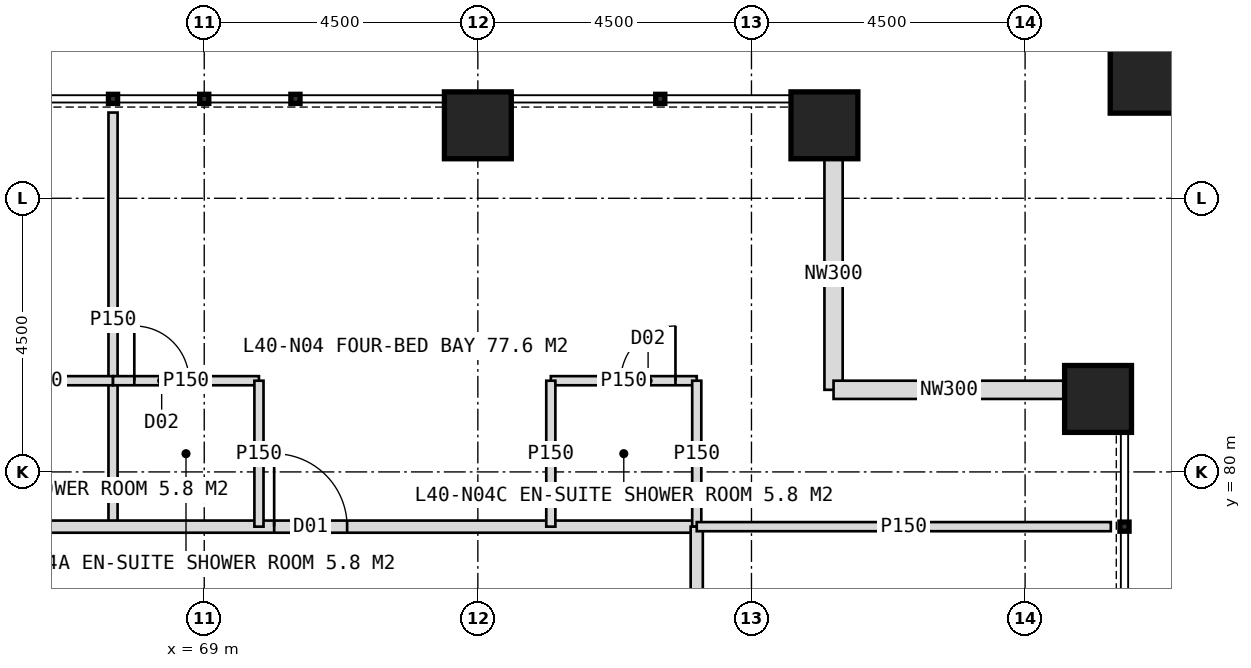
"""IFC4 building model, lengths in metres.
Left out: names, types, materials, properties, quantities, classifications, styles, units other than length and angle.
Written with IfcOpenShell. Run it as: python <this file> out.ifc"""

import sys

from ifc_helpers import new_model, si_unit, direction, frame, frame_2d, origin, origin_2d, place, context, subcontext, project, spatial, rectangle, hollow_rectangle, extrude, element, fill, save


model = new_model("IFC4")
c1 = context("Model", 3, precision=1e-05, world=origin(), true_north=direction((0.0, 1.0)))
c2 = subcontext(c1, "Body", "Model", "MODEL_VIEW")
j1 = project(units=[si_unit("LENGTHUNIT", "METRE"), si_unit("PLANEANGLEUNIT", "RADIAN")], contexts=[c1])
p1 = place(None, origin())
s1 = spatial("IfcSite", under=j1, at=p1, CompositionType="ELEMENT")
p2 = place(p1, origin())
s2 = spatial("IfcBuilding", under=s1, at=p2, CompositionType="ELEMENT")
p3 = place(p2, frame((0.0, 0.0, 168.0)))
s3 = spatial("IfcBuildingStorey", under=s2, at=p3, CompositionType="ELEMENT", Elevation=168.0)
for number, where, z_axis, x_axis in (
    (1, (73.5, 85.7, 0.0), (0.0, 0.0, 1.0), (1.0, 0.0, 0.0)),
    (2, (79.2, 85.7, 0.0), (0.0, 0.0, 1.0), (1.0, 0.0, 0.0)),
    (3, (83.7, 81.2, 0.0), (0.0, 0.0, 1.0), (1.0, 0.0, 0.0)),
):
    element("IfcColumn", number, at=place(p3, frame(where, z_axis=z_axis, x_axis=x_axis)), inside=s3, PredefinedType="COLUMN", context=c2, shape_type="SweptSolid", body=[
        extrude(hollow_rectangle(XDim=1.1, YDim=1.1, WallThickness=0.1, at=origin_2d()), origin(), (0.0, 0.0, 1.0), 4.0),
    ])
p4 = place(p3, frame((84.6, 86.6, 0.0), z_axis=(0.0, 0.0, 1.0), x_axis=(1.0, 0.0, 0.0)))
e4 = element("IfcColumn", 4, at=p4, inside=s3, PredefinedType="COLUMN", context=c2, shape_type="SweptSolid", body=[
    extrude(hollow_rectangle(XDim=1.4, YDim=1.4, WallThickness=0.08, at=origin_2d()), origin(), (0.0, 0.0, 1.0), 2.0),
])
for number, where, z_axis, x_axis in (
    (5, (79.35, 85.15, 0.0), (0.0, 0.0, 1.0), (0.0, -1.0, 0.0)),
    (6, (79.35, 81.35, 0.0), (0.0, 0.0, 1.0), (1.0, 0.0, 0.0)),
):
    element("IfcWall", number, at=place(p3, frame(where, z_axis=z_axis, x_axis=x_axis)), inside=s3, PredefinedType="ELEMENTEDWALL", context=c2, shape_type="SweptSolid", body=[
        extrude(rectangle(XDim=3.8, YDim=0.3, at=frame_2d((1.9, 0.0))), origin(), (0.0, 0.0, 1.0), 4.0),
    ])
p5 = place(p3, frame((67.5, 79.1, 0.0), z_axis=(0.0, 0.0, 1.0), x_axis=(0.0, 1.0, 0.0)))
e7 = element("IfcWall", 7, at=p5, inside=s3, PredefinedType="PARTITIONING", context=c2, shape_type="SweptSolid", body=[
    extrude(rectangle(XDim=6.81, YDim=0.15, at=frame_2d((3.405, 0.0))), origin(), (0.0, 0.0, 1.0), 3.75),
])
p6 = place(p3, frame((42.9, 79.1, 0.0), z_axis=(0.0, 0.0, 1.0), x_axis=(1.0, 0.0, 0.0)))
e8 = element("IfcWall", 8, at=p6, inside=s3, PredefinedType="PARTITIONING", context=c2, shape_type="SweptSolid", body=[
    extrude(rectangle(XDim=34.2, YDim=0.2, at=frame_2d((17.1, 0.0))), origin(), (0.0, 0.0, 1.0), 3.75),
])
p7 = place(p6, frame((3.55, 0.0, 0.0)))
e9 = element("IfcOpeningElement", 9, at=p7, cuts=e8, PredefinedType="OPENING", context=c2, shape_type="SweptSolid", body=[
    extrude(rectangle(XDim=1.0, YDim=2.1, at=frame_2d((0.5, 1.05))), frame((0.0, 0.11, 0.0), z_axis=(0.0, -1.0, 0.0), x_axis=(1.0, 0.0, 0.0)), (0.0, 0.0, 1.0), 0.22),
])
p8 = place(p6, frame((10.75, 0.0, 0.0)))
e10 = element("IfcOpeningElement", 10, at=p8, cuts=e8, PredefinedType="OPENING", context=c2, shape_type="SweptSolid", body=[
    extrude(rectangle(XDim=1.2, YDim=2.2, at=frame_2d((0.6, 1.1))), frame((0.0, 0.11, 0.0), z_axis=(0.0, -1.0, 0.0), x_axis=(1.0, 0.0, 0.0)), (0.0, 0.0, 1.0), 0.22),
])
p9 = place(p6, frame((20.75, 0.0, 0.0)))
e11 = element("IfcOpeningElement", 11, at=p9, cuts=e8, PredefinedType="OPENING", context=c2, shape_type="SweptSolid", body=[
    extrude(rectangle(XDim=1.2, YDim=2.2, at=frame_2d((0.6, 1.1))), frame((0.0, 0.11, 0.0), z_axis=(0.0, -1.0, 0.0), x_axis=(1.0, 0.0, 0.0)), (0.0, 0.0, 1.0), 0.22),
])
p10 = place(p6, frame((27.25, 0.0, 0.0)))
e12 = element("IfcOpeningElement", 12, at=p10, cuts=e8, PredefinedType="OPENING", context=c2, shape_type="SweptSolid", body=[
    extrude(rectangle(XDim=1.2, YDim=2.2, at=frame_2d((0.6, 1.1))), frame((0.0, 0.11, 0.0), z_axis=(0.0, -1.0, 0.0), x_axis=(1.0, 0.0, 0.0)), (0.0, 0.0, 1.0), 0.22),
])
p11 = place(p3, frame((65.1, 81.5, 0.0), z_axis=(0.0, 0.0, 1.0), x_axis=(1.0, 0.0, 0.0)))
e13 = element("IfcWall", 13, at=p11, inside=s3, PredefinedType="PARTITIONING", context=c2, shape_type="SweptSolid", body=[
    extrude(rectangle(XDim=2.4, YDim=0.15, at=frame_2d((1.2, 0.0))), origin(), (0.0, 0.0, 1.0), 3.75),
])
p12 = place(p11, frame((0.35, 0.0, 0.0)))
e14 = element("IfcOpeningElement", 14, at=p12, cuts=e13, PredefinedType="OPENING", context=c2, shape_type="SweptSolid", body=[
    extrude(rectangle(XDim=0.9, YDim=2.1, at=frame_2d((0.45, 1.05))), frame((0.0, 0.085, 0.0), z_axis=(0.0, -1.0, 0.0), x_axis=(1.0, 0.0, 0.0)), (0.0, 0.0, 1.0), 0.17),
])
p13 = place(p3, frame((67.5, 81.5, 0.0), z_axis=(0.0, 0.0, 1.0), x_axis=(1.0, 0.0, 0.0)))
e15 = element("IfcWall", 15, at=p13, inside=s3, PredefinedType="PARTITIONING", context=c2, shape_type="SweptSolid", body=[
    extrude(rectangle(XDim=2.4, YDim=0.15, at=frame_2d((1.2, 0.0))), origin(), (0.0, 0.0, 1.0), 3.75),
])
p14 = place(p13, frame((0.35, 0.0, 0.0)))
e16 = element("IfcOpeningElement", 16, at=p14, cuts=e15, PredefinedType="OPENING", context=c2, shape_type="SweptSolid", body=[
    extrude(rectangle(XDim=0.9, YDim=2.1, at=frame_2d((0.45, 1.05))), frame((0.0, 0.085, 0.0), z_axis=(0.0, -1.0, 0.0), x_axis=(1.0, 0.0, 0.0)), (0.0, 0.0, 1.0), 0.17),
])
p15 = place(p3, frame((69.9, 79.1, 0.0), z_axis=(0.0, 0.0, 1.0), x_axis=(0.0, 1.0, 0.0)))
e17 = element("IfcWall", 17, at=p15, inside=s3, PredefinedType="PARTITIONING", context=c2, shape_type="SweptSolid", body=[
    extrude(rectangle(XDim=2.4, YDim=0.15, at=frame_2d((1.2, 0.0))), origin(), (0.0, 0.0, 1.0), 3.75),
])
p16 = place(p3, frame((74.7, 81.5, 0.0), z_axis=(0.0, 0.0, 1.0), x_axis=(1.0, 0.0, 0.0)))
e18 = element("IfcWall", 18, at=p16, inside=s3, PredefinedType="PARTITIONING", context=c2, shape_type="SweptSolid", body=[
    extrude(rectangle(XDim=2.4, YDim=0.15, at=frame_2d((1.2, 0.0))), origin(), (0.0, 0.0, 1.0), 3.75),
])
p17 = place(p16, frame((1.15, 0.0, 0.0)))
e19 = element("IfcOpeningElement", 19, at=p17, cuts=e18, PredefinedType="OPENING", context=c2, shape_type="SweptSolid", body=[
    extrude(rectangle(XDim=0.9, YDim=2.1, at=frame_2d((0.45, 1.05))), frame((0.0, 0.085, 0.0), z_axis=(0.0, -1.0, 0.0), x_axis=(1.0, 0.0, 0.0)), (0.0, 0.0, 1.0), 0.17),
])
for number, where, z_axis, x_axis in (
    (20, (74.7, 79.1, 0.0), (0.0, 0.0, 1.0), (0.0, 1.0, 0.0)),
    (21, (77.1, 79.1, 0.0), (0.0, 0.0, 1.0), (0.0, 1.0, 0.0)),
):
    element("IfcWall", number, at=place(p3, frame(where, z_axis=z_axis, x_axis=x_axis)), inside=s3, PredefinedType="PARTITIONING", context=c2, shape_type="SweptSolid", body=[
        extrude(rectangle(XDim=2.4, YDim=0.15, at=frame_2d((1.2, 0.0))), origin(), (0.0, 0.0, 1.0), 3.75),
    ])
p18 = place(p3, frame((77.1, 79.1, 0.0), z_axis=(0.0, 0.0, 1.0), x_axis=(0.0, -1.0, 0.0)))
e22 = element("IfcWall", 22, at=p18, inside=s3, PredefinedType="PARTITIONING", context=c2, shape_type="SweptSolid", body=[
    extrude(rectangle(XDim=34.2, YDim=0.2, at=frame_2d((17.1, 0.0))), origin(), (0.0, 0.0, 1.0), 3.75),
])
p19 = place(p18, frame((3.65, 0.0, 0.0)))
e23 = element("IfcOpeningElement", 23, at=p19, cuts=e22, PredefinedType="OPENING", context=c2, shape_type="SweptSolid", body=[
    extrude(rectangle(XDim=1.2, YDim=2.2, at=frame_2d((0.6, 1.1))), frame((0.0, 0.11, 0.0), z_axis=(0.0, -1.0, 0.0), x_axis=(1.0, 0.0, 0.0)), (0.0, 0.0, 1.0), 0.22),
])
p20 = place(p18, frame((10.75, 0.0, 0.0)))
e24 = element("IfcOpeningElement", 24, at=p20, cuts=e22, PredefinedType="OPENING", context=c2, shape_type="SweptSolid", body=[
    extrude(rectangle(XDim=1.2, YDim=2.2, at=frame_2d((0.6, 1.1))), frame((0.0, 0.11, 0.0), z_axis=(0.0, -1.0, 0.0), x_axis=(1.0, 0.0, 0.0)), (0.0, 0.0, 1.0), 0.22),
])
p21 = place(p18, frame((22.25, 0.0, 0.0)))
e25 = element("IfcOpeningElement", 25, at=p21, cuts=e22, PredefinedType="OPENING", context=c2, shape_type="SweptSolid", body=[
    extrude(rectangle(XDim=1.2, YDim=2.2, at=frame_2d((0.6, 1.1))), frame((0.0, 0.11, 0.0), z_axis=(0.0, -1.0, 0.0), x_axis=(1.0, 0.0, 0.0)), (0.0, 0.0, 1.0), 0.22),
])
p22 = place(p18, frame((28.75, 0.0, 0.0)))
e26 = element("IfcOpeningElement", 26, at=p22, cuts=e22, PredefinedType="OPENING", context=c2, shape_type="SweptSolid", body=[
    extrude(rectangle(XDim=1.2, YDim=2.2, at=frame_2d((0.6, 1.1))), frame((0.0, 0.11, 0.0), z_axis=(0.0, -1.0, 0.0), x_axis=(1.0, 0.0, 0.0)), (0.0, 0.0, 1.0), 0.22),
])
p23 = place(p3, frame((77.1, 79.1, 0.0), z_axis=(0.0, 0.0, 1.0), x_axis=(1.0, 0.0, 0.0)))
e27 = element("IfcWall", 27, at=p23, inside=s3, PredefinedType="PARTITIONING", context=c2, shape_type="SweptSolid", body=[
    extrude(rectangle(XDim=6.81, YDim=0.15, at=frame_2d((3.405, 0.0))), origin(), (0.0, 0.0, 1.0), 3.75),
])
p24 = place(p10, origin())
e28 = element("IfcDoor", 28, at=p24, inside=s3, OperationType="SINGLE_SWING_LEFT", PredefinedType="DOOR", context=c2, shape_type="SweptSolid", body=[
    extrude(rectangle(XDim=1.2, YDim=2.2, at=frame_2d((0.6, 1.1))), frame((0.0, 0.025, 0.0), z_axis=(0.0, -1.0, 0.0), x_axis=(1.0, 0.0, 0.0)), (0.0, 0.0, 1.0), 0.05),
])
fill(e12, e28)
p25 = place(p14, origin())
e29 = element("IfcDoor", 29, at=p25, inside=s3, OperationType="SINGLE_SWING_LEFT", PredefinedType="DOOR", context=c2, shape_type="SweptSolid", body=[
    extrude(rectangle(XDim=0.9, YDim=2.1, at=frame_2d((0.45, 1.05))), frame((0.0, 0.025, 0.0), z_axis=(0.0, -1.0, 0.0), x_axis=(1.0, 0.0, 0.0)), (0.0, 0.0, 1.0), 0.05),
])
fill(e16, e29)
p26 = place(p17, origin())
e30 = element("IfcDoor", 30, at=p26, inside=s3, OperationType="SINGLE_SWING_RIGHT", PredefinedType="DOOR", context=c2, shape_type="SweptSolid", body=[
    extrude(rectangle(XDim=0.9, YDim=2.1, at=frame_2d((0.45, 1.05))), frame((0.0, 0.025, 0.0), z_axis=(0.0, -1.0, 0.0), x_axis=(1.0, 0.0, 0.0)), (0.0, 0.0, 1.0), 0.05),
])
fill(e19, e30)
save(model, sys.argv[1])
